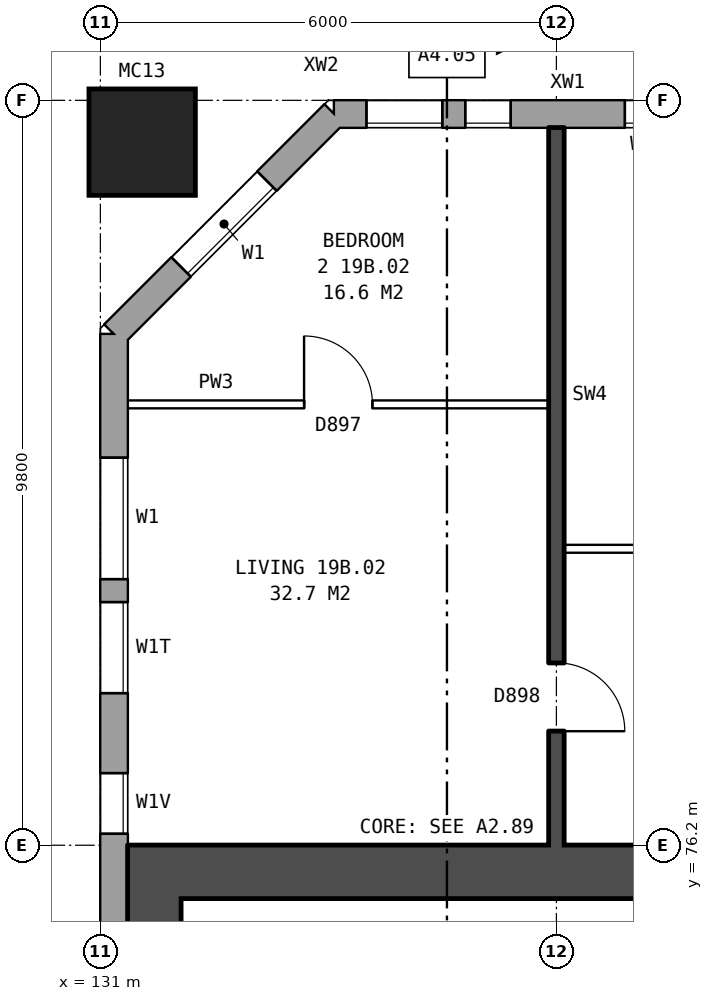
"""IFC4 building model, lengths in metres.
Left out: names, types, materials, properties, quantities, classifications, styles, units other than length and angle.
Written with IfcOpenShell. Run it as: python <this file> out.ifc"""

import sys

from ifc_helpers import new_model, si_unit, direction, frame, frame_2d, origin, origin_2d, place, context, subcontext, project, spatial, rectangle, hollow_rectangle, extrude, element, fill, save


model = new_model("IFC4")
c1 = context("Model", 3, precision=1e-05, world=origin(), true_north=direction((0.0, 1.0)))
c2 = subcontext(c1, "Body", "Model", "MODEL_VIEW")
j1 = project(units=[si_unit("LENGTHUNIT", "METRE"), si_unit("PLANEANGLEUNIT", "RADIAN")], contexts=[c1])
p1 = place(None, origin())
s1 = spatial("IfcSite", under=j1, at=p1, CompositionType="ELEMENT")
p2 = place(p1, origin())
s2 = spatial("IfcBuilding", under=s1, at=p2, CompositionType="ELEMENT")
p3 = place(p2, frame((0.0, 0.0, 71.6)))
s3 = spatial("IfcBuildingStorey", under=s2, at=p3, CompositionType="ELEMENT", Elevation=71.6)
p4 = place(p3, frame((131.55, 85.45, 0.0), z_axis=(0.0, 0.0, 1.0), x_axis=(1.0, 0.0, 0.0)))
e1 = element("IfcColumn", 1, at=p4, inside=s3, PredefinedType="COLUMN", context=c2, shape_type="SweptSolid", body=[
    extrude(hollow_rectangle(XDim=1.4, YDim=1.4, WallThickness=0.075, at=origin_2d()), origin(), (0.0, 0.0, 1.0), 3.1),
])
p5 = place(p3, frame((172.175, 85.82, 0.0), z_axis=(0.0, 0.0, 1.0), x_axis=(-1.0, 0.0, 0.0)))
e2 = element("IfcWall", 2, at=p5, inside=s3, PredefinedType="STANDARD", context=c2, shape_type="SweptSolid", body=[
    extrude(rectangle(XDim=38.101, YDim=0.36, at=frame_2d((19.05, 0.0))), origin(), (0.0, 0.0, 1.0), 2.85),
])
p6 = place(p5, frame((0.3, 0.0, 0.8)))
e3 = element("IfcOpeningElement", 3, at=p6, cuts=e2, PredefinedType="OPENING", context=c2, shape_type="SweptSolid", body=[
    extrude(rectangle(XDim=1.0, YDim=1.8, at=frame_2d((0.5, 0.9))), frame((0.0, 0.19, 0.0), z_axis=(0.0, -1.0, 0.0), x_axis=(1.0, 0.0, 0.0)), (0.0, 0.0, 1.0), 0.38),
])
p7 = place(p5, frame((5.875, 0.0, 0.8)))
e4 = element("IfcOpeningElement", 4, at=p7, cuts=e2, PredefinedType="OPENING", context=c2, shape_type="SweptSolid", body=[
    extrude(rectangle(XDim=1.6, YDim=1.8, at=frame_2d((0.8, 0.9))), frame((0.0, 0.19, 0.0), z_axis=(0.0, -1.0, 0.0), x_axis=(1.0, 0.0, 0.0)), (0.0, 0.0, 1.0), 0.38),
])
p8 = place(p5, frame((8.875, 0.0, 0.8)))
e5 = element("IfcOpeningElement", 5, at=p8, cuts=e2, PredefinedType="OPENING", context=c2, shape_type="SweptSolid", body=[
    extrude(rectangle(XDim=1.6, YDim=1.8, at=frame_2d((0.8, 0.9))), frame((0.0, 0.19, 0.0), z_axis=(0.0, -1.0, 0.0), x_axis=(1.0, 0.0, 0.0)), (0.0, 0.0, 1.0), 0.38),
])
p9 = place(p5, frame((11.875, 0.0, 0.8)))
e6 = element("IfcOpeningElement", 6, at=p9, cuts=e2, PredefinedType="OPENING", context=c2, shape_type="SweptSolid", body=[
    extrude(rectangle(XDim=1.6, YDim=1.8, at=frame_2d((0.8, 0.9))), frame((0.0, 0.19, 0.0), z_axis=(0.0, -1.0, 0.0), x_axis=(1.0, 0.0, 0.0)), (0.0, 0.0, 1.0), 0.38),
])
p10 = place(p5, frame((14.875, 0.0, 0.8)))
e7 = element("IfcOpeningElement", 7, at=p10, cuts=e2, PredefinedType="OPENING", context=c2, shape_type="SweptSolid", body=[
    extrude(rectangle(XDim=1.6, YDim=1.8, at=frame_2d((0.8, 0.9))), frame((0.0, 0.19, 0.0), z_axis=(0.0, -1.0, 0.0), x_axis=(1.0, 0.0, 0.0)), (0.0, 0.0, 1.0), 0.38),
])
p11 = place(p5, frame((17.875, 0.0, 0.8)))
e8 = element("IfcOpeningElement", 8, at=p11, cuts=e2, PredefinedType="OPENING", context=c2, shape_type="SweptSolid", body=[
    extrude(rectangle(XDim=1.6, YDim=1.8, at=frame_2d((0.8, 0.9))), frame((0.0, 0.19, 0.0), z_axis=(0.0, -1.0, 0.0), x_axis=(1.0, 0.0, 0.0)), (0.0, 0.0, 1.0), 0.38),
])
p12 = place(p5, frame((20.875, 0.0, 0.8)))
e9 = element("IfcOpeningElement", 9, at=p12, cuts=e2, PredefinedType="OPENING", context=c2, shape_type="SweptSolid", body=[
    extrude(rectangle(XDim=1.6, YDim=1.8, at=frame_2d((0.8, 0.9))), frame((0.0, 0.19, 0.0), z_axis=(0.0, -1.0, 0.0), x_axis=(1.0, 0.0, 0.0)), (0.0, 0.0, 1.0), 0.38),
])
p13 = place(p5, frame((23.875, 0.0, 0.8)))
e10 = element("IfcOpeningElement", 10, at=p13, cuts=e2, PredefinedType="OPENING", context=c2, shape_type="SweptSolid", body=[
    extrude(rectangle(XDim=1.6, YDim=1.8, at=frame_2d((0.8, 0.9))), frame((0.0, 0.19, 0.0), z_axis=(0.0, -1.0, 0.0), x_axis=(1.0, 0.0, 0.0)), (0.0, 0.0, 1.0), 0.38),
])
p14 = place(p5, frame((26.875, 0.0, 0.8)))
e11 = element("IfcOpeningElement", 11, at=p14, cuts=e2, PredefinedType="OPENING", context=c2, shape_type="SweptSolid", body=[
    extrude(rectangle(XDim=1.6, YDim=1.8, at=frame_2d((0.8, 0.9))), frame((0.0, 0.19, 0.0), z_axis=(0.0, -1.0, 0.0), x_axis=(1.0, 0.0, 0.0)), (0.0, 0.0, 1.0), 0.38),
])
p15 = place(p5, frame((29.875, 0.0, 0.8)))
e12 = element("IfcOpeningElement", 12, at=p15, cuts=e2, PredefinedType="OPENING", context=c2, shape_type="SweptSolid", body=[
    extrude(rectangle(XDim=1.6, YDim=1.8, at=frame_2d((0.8, 0.9))), frame((0.0, 0.19, 0.0), z_axis=(0.0, -1.0, 0.0), x_axis=(1.0, 0.0, 0.0)), (0.0, 0.0, 1.0), 0.38),
])
p16 = place(p5, frame((31.775, 0.0, 0.8)))
e13 = element("IfcOpeningElement", 13, at=p16, cuts=e2, PredefinedType="OPENING", context=c2, shape_type="SweptSolid", body=[
    extrude(rectangle(XDim=1.6, YDim=1.8, at=frame_2d((0.8, 0.9))), frame((0.0, 0.19, 0.0), z_axis=(0.0, -1.0, 0.0), x_axis=(1.0, 0.0, 0.0)), (0.0, 0.0, 1.0), 0.38),
])
p17 = place(p5, frame((35.775, 0.0, 1.7)))
e14 = element("IfcOpeningElement", 14, at=p17, cuts=e2, PredefinedType="OPENING", context=c2, shape_type="SweptSolid", body=[
    extrude(rectangle(XDim=0.6, YDim=0.9, at=frame_2d((0.3, 0.45))), frame((0.0, 0.19, 0.0), z_axis=(0.0, -1.0, 0.0), x_axis=(1.0, 0.0, 0.0)), (0.0, 0.0, 1.0), 0.38),
])
p18 = place(p5, frame((1.6, 0.0, 1.6)))
e15 = element("IfcOpeningElement", 15, at=p18, cuts=e2, PredefinedType="OPENING", context=c2, shape_type="SweptSolid", body=[
    extrude(rectangle(XDim=0.6, YDim=0.9, at=frame_2d((0.3, 0.45))), frame((0.0, 0.19, 0.0), z_axis=(0.0, -1.0, 0.0), x_axis=(1.0, 0.0, 0.0)), (0.0, 0.0, 1.0), 0.38),
])
p19 = place(p5, frame((3.5, 0.0, 0.8)))
e16 = element("IfcOpeningElement", 16, at=p19, cuts=e2, PredefinedType="OPENING", context=c2, shape_type="SweptSolid", body=[
    extrude(rectangle(XDim=1.4, YDim=0.9, at=frame_2d((0.7, 0.45))), frame((0.0, 0.19, 0.0), z_axis=(0.0, -1.0, 0.0), x_axis=(1.0, 0.0, 0.0)), (0.0, 0.0, 1.0), 0.38),
])
p20 = place(p5, frame((33.675, 0.0, 0.8)))
e17 = element("IfcOpeningElement", 17, at=p20, cuts=e2, PredefinedType="OPENING", context=c2, shape_type="SweptSolid", body=[
    extrude(rectangle(XDim=0.6, YDim=1.2, at=frame_2d((0.3, 0.6))), frame((0.0, 0.19, 0.0), z_axis=(0.0, -1.0, 0.0), x_axis=(1.0, 0.0, 0.0)), (0.0, 0.0, 1.0), 0.38),
])
p21 = place(p5, frame((36.675, 0.0, 0.8)))
e18 = element("IfcOpeningElement", 18, at=p21, cuts=e2, PredefinedType="OPENING", context=c2, shape_type="SweptSolid", body=[
    extrude(rectangle(XDim=1.0, YDim=1.8, at=frame_2d((0.5, 0.9))), frame((0.0, 0.19, 0.0), z_axis=(0.0, -1.0, 0.0), x_axis=(1.0, 0.0, 0.0)), (0.0, 0.0, 1.0), 0.38),
])
p22 = place(p3, frame((134.075, 85.82, 0.0), z_axis=(0.0, 0.0, 1.0), x_axis=(-0.707106781187, -0.707106781187, 0.0)))
e19 = element("IfcWall", 19, at=p22, inside=s3, PredefinedType="STANDARD", context=c2, shape_type="SweptSolid", body=[
    extrude(rectangle(XDim=4.094, YDim=0.36, at=frame_2d((2.047, 0.0))), origin(), (0.0, 0.0, 1.0), 2.85),
])
p23 = place(p22, frame((1.247, 0.0, 0.8)))
e20 = element("IfcOpeningElement", 20, at=p23, cuts=e19, PredefinedType="OPENING", context=c2, shape_type="SweptSolid", body=[
    extrude(rectangle(XDim=1.6, YDim=1.8, at=frame_2d((0.8, 0.9))), frame((0.0, 0.19, 0.0), z_axis=(0.0, -1.0, 0.0), x_axis=(1.0, 0.0, 0.0)), (0.0, 0.0, 1.0), 0.38),
])
p24 = place(p3, frame((131.18, 82.925, 0.0), z_axis=(0.0, 0.0, 1.0), x_axis=(0.0, -1.0, 0.0)))
e21 = element("IfcWall", 21, at=p24, inside=s3, PredefinedType="STANDARD", context=c2, shape_type="SweptSolid", body=[
    extrude(rectangle(XDim=25.851, YDim=0.36, at=frame_2d((12.925, 0.0))), origin(), (0.0, 0.0, 1.0), 2.85),
])
p25 = place(p24, frame((1.625, 0.0, 0.8)))
e22 = element("IfcOpeningElement", 22, at=p25, cuts=e21, PredefinedType="OPENING", context=c2, shape_type="SweptSolid", body=[
    extrude(rectangle(XDim=1.6, YDim=1.8, at=frame_2d((0.8, 0.9))), frame((0.0, 0.19, 0.0), z_axis=(0.0, -1.0, 0.0), x_axis=(1.0, 0.0, 0.0)), (0.0, 0.0, 1.0), 0.38),
])
p26 = place(p24, frame((3.525, 0.0, 1.7)))
e23 = element("IfcOpeningElement", 23, at=p26, cuts=e21, PredefinedType="OPENING", context=c2, shape_type="SweptSolid", body=[
    extrude(rectangle(XDim=1.2, YDim=0.9, at=frame_2d((0.6, 0.45))), frame((0.0, 0.19, 0.0), z_axis=(0.0, -1.0, 0.0), x_axis=(1.0, 0.0, 0.0)), (0.0, 0.0, 1.0), 0.38),
])
p27 = place(p24, frame((19.225, 0.0, 0.8)))
e24 = element("IfcOpeningElement", 24, at=p27, cuts=e21, PredefinedType="OPENING", context=c2, shape_type="SweptSolid", body=[
    extrude(rectangle(XDim=0.8, YDim=0.9, at=frame_2d((0.4, 0.45))), frame((0.0, 0.19, 0.0), z_axis=(0.0, -1.0, 0.0), x_axis=(1.0, 0.0, 0.0)), (0.0, 0.0, 1.0), 0.38),
])
p28 = place(p24, frame((22.625, 0.0, 0.8)))
e25 = element("IfcOpeningElement", 25, at=p28, cuts=e21, PredefinedType="OPENING", context=c2, shape_type="SweptSolid", body=[
    extrude(rectangle(XDim=1.6, YDim=1.8, at=frame_2d((0.8, 0.9))), frame((0.0, 0.19, 0.0), z_axis=(0.0, -1.0, 0.0), x_axis=(1.0, 0.0, 0.0)), (0.0, 0.0, 1.0), 0.38),
])
p29 = place(p24, frame((5.775, 0.0, 0.8)))
e26 = element("IfcOpeningElement", 26, at=p29, cuts=e21, PredefinedType="OPENING", context=c2, shape_type="SweptSolid", body=[
    extrude(rectangle(XDim=0.8, YDim=0.9, at=frame_2d((0.4, 0.45))), frame((0.0, 0.19, 0.0), z_axis=(0.0, -1.0, 0.0), x_axis=(1.0, 0.0, 0.0)), (0.0, 0.0, 1.0), 0.38),
])
p30 = place(p24, frame((21.075, 0.0, 1.7)))
e27 = element("IfcOpeningElement", 27, at=p30, cuts=e21, PredefinedType="OPENING", context=c2, shape_type="SweptSolid", body=[
    extrude(rectangle(XDim=1.2, YDim=0.9, at=frame_2d((0.6, 0.45))), frame((0.0, 0.19, 0.0), z_axis=(0.0, -1.0, 0.0), x_axis=(1.0, 0.0, 0.0)), (0.0, 0.0, 1.0), 0.38),
])
p31 = place(p3, frame((131.71, 64.5, 0.0), z_axis=(0.0, 0.0, 1.0), x_axis=(0.0, 1.0, 0.0)))
e28 = element("IfcWall", 28, at=p31, inside=s3, PredefinedType="SHEAR", context=c2, shape_type="SweptSolid", body=[
    extrude(rectangle(XDim=11.0, YDim=0.7, at=frame_2d((5.5, 0.0))), origin(), (0.0, 0.0, 1.0), 2.85),
])
p32 = place(p3, frame((139.76, 75.85, 0.0), z_axis=(0.0, 0.0, 1.0), x_axis=(-1.0, 0.0, 0.0)))
e29 = element("IfcWall", 29, at=p32, inside=s3, PredefinedType="SHEAR", context=c2, shape_type="SweptSolid", body=[
    extrude(rectangle(XDim=8.4, YDim=0.7, at=frame_2d((4.2, 0.0))), origin(), (0.0, 0.0, 1.0), 2.85),
])
p33 = place(p3, frame((137.1, 80.1, 0.0), z_axis=(0.0, 0.0, 1.0), x_axis=(1.0, 0.0, 0.0)))
e30 = element("IfcWall", 30, at=p33, inside=s3, PredefinedType="PARTITIONING", context=c2, shape_type="SweptSolid", body=[
    extrude(rectangle(XDim=5.8, YDim=0.1, at=frame_2d((2.9, 0.0))), origin(), (0.0, 0.0, 1.0), 2.85),
])
p34 = place(p33, frame((1.3, 0.0, 0.0)))
e31 = element("IfcOpeningElement", 31, at=p34, cuts=e30, PredefinedType="OPENING", context=c2, shape_type="SweptSolid", body=[
    extrude(rectangle(XDim=0.9, YDim=2.1, at=frame_2d((0.45, 1.05))), frame((0.0, 0.06, 0.0), z_axis=(0.0, -1.0, 0.0), x_axis=(1.0, 0.0, 0.0)), (0.0, 0.0, 1.0), 0.12),
])
p35 = place(p33, frame((4.2, 0.0, 0.0)))
e32 = element("IfcOpeningElement", 32, at=p35, cuts=e30, PredefinedType="OPENING", context=c2, shape_type="SweptSolid", body=[
    extrude(rectangle(XDim=0.9, YDim=2.1, at=frame_2d((0.45, 1.05))), frame((0.0, 0.06, 0.0), z_axis=(0.0, -1.0, 0.0), x_axis=(1.0, 0.0, 0.0)), (0.0, 0.0, 1.0), 0.12),
])
p36 = place(p3, frame((131.36, 82.0, 0.0), z_axis=(0.0, 0.0, 1.0), x_axis=(1.0, 0.0, 0.0)))
e33 = element("IfcWall", 33, at=p36, inside=s3, PredefinedType="PARTITIONING", context=c2, shape_type="SweptSolid", body=[
    extrude(rectangle(XDim=5.54, YDim=0.1, at=frame_2d((2.77, 0.0))), origin(), (0.0, 0.0, 1.0), 2.85),
])
p37 = place(p36, frame((2.32, 0.0, 0.0)))
e34 = element("IfcOpeningElement", 34, at=p37, cuts=e33, PredefinedType="OPENING", context=c2, shape_type="SweptSolid", body=[
    extrude(rectangle(XDim=0.9, YDim=2.1, at=frame_2d((0.45, 1.05))), frame((0.0, 0.06, 0.0), z_axis=(0.0, -1.0, 0.0), x_axis=(1.0, 0.0, 0.0)), (0.0, 0.0, 1.0), 0.12),
])
p38 = place(p3, frame((137.0, 76.2, 0.0), z_axis=(0.0, 0.0, 1.0), x_axis=(0.0, 1.0, 0.0)))
e35 = element("IfcWall", 35, at=p38, inside=s3, PredefinedType="SOLIDWALL", context=c2, shape_type="SweptSolid", body=[
    extrude(rectangle(XDim=9.44, YDim=0.2, at=frame_2d((4.72, 0.0))), origin(), (0.0, 0.0, 1.0), 2.85),
])
p39 = place(p38, frame((1.5, 0.0, 0.0)))
e36 = element("IfcOpeningElement", 36, at=p39, cuts=e35, PredefinedType="OPENING", context=c2, shape_type="SweptSolid", body=[
    extrude(rectangle(XDim=0.9, YDim=2.1, at=frame_2d((0.45, 1.05))), frame((0.0, 0.11, 0.0), z_axis=(0.0, -1.0, 0.0), x_axis=(1.0, 0.0, 0.0)), (0.0, 0.0, 1.0), 0.22),
])
p40 = place(p17, origin())
e37 = element("IfcWindow", 37, at=p40, inside=s3, PartitioningType="SINGLE_PANEL", PredefinedType="WINDOW", context=c2, shape_type="SweptSolid", body=[
    extrude(rectangle(XDim=0.6, YDim=0.9, at=frame_2d((0.3, 0.45))), frame((0.0, 0.15, 0.0), z_axis=(0.0, -1.0, 0.0), x_axis=(1.0, 0.0, 0.0)), (0.0, 0.0, 1.0), 0.06),
])
fill(e14, e37)
p41 = place(p23, origin())
e38 = element("IfcWindow", 38, at=p41, inside=s3, PartitioningType="SINGLE_PANEL", PredefinedType="WINDOW", context=c2, shape_type="SweptSolid", body=[
    extrude(rectangle(XDim=1.6, YDim=1.8, at=frame_2d((0.8, 0.9))), frame((0.0, 0.15, 0.0), z_axis=(0.0, -1.0, 0.0), x_axis=(1.0, 0.0, 0.0)), (0.0, 0.0, 1.0), 0.06),
])
fill(e20, e38)
p42 = place(p25, origin())
e39 = element("IfcWindow", 39, at=p42, inside=s3, PartitioningType="SINGLE_PANEL", PredefinedType="WINDOW", context=c2, shape_type="SweptSolid", body=[
    extrude(rectangle(XDim=1.6, YDim=1.8, at=frame_2d((0.8, 0.9))), frame((0.0, 0.15, 0.0), z_axis=(0.0, -1.0, 0.0), x_axis=(1.0, 0.0, 0.0)), (0.0, 0.0, 1.0), 0.06),
])
fill(e22, e39)
p43 = place(p26, origin())
e40 = element("IfcWindow", 40, at=p43, inside=s3, PartitioningType="SINGLE_PANEL", PredefinedType="WINDOW", context=c2, shape_type="SweptSolid", body=[
    extrude(rectangle(XDim=1.2, YDim=0.9, at=frame_2d((0.6, 0.45))), frame((0.0, 0.15, 0.0), z_axis=(0.0, -1.0, 0.0), x_axis=(1.0, 0.0, 0.0)), (0.0, 0.0, 1.0), 0.06),
])
fill(e23, e40)
p44 = place(p37, origin())
e41 = element("IfcDoor", 41, at=p44, inside=s3, OperationType="SINGLE_SWING_LEFT", PredefinedType="DOOR", context=c2, shape_type="SweptSolid", body=[
    extrude(rectangle(XDim=0.9, YDim=2.1, at=frame_2d((0.45, 1.05))), frame((0.0, 0.025, 0.0), z_axis=(0.0, -1.0, 0.0), x_axis=(1.0, 0.0, 0.0)), (0.0, 0.0, 1.0), 0.05),
])
fill(e34, e41)
p45 = place(p39, frame((0.9, 0.0, 0.0), z_axis=(0.0, 0.0, 1.0), x_axis=(-1.0, 0.0, 0.0)))
e42 = element("IfcDoor", 42, at=p45, inside=s3, OperationType="SINGLE_SWING_RIGHT", PredefinedType="DOOR", context=c2, shape_type="SweptSolid", body=[
    extrude(rectangle(XDim=0.9, YDim=2.1, at=frame_2d((0.45, 1.05))), frame((0.0, 0.025, 0.0), z_axis=(0.0, -1.0, 0.0), x_axis=(1.0, 0.0, 0.0)), (0.0, 0.0, 1.0), 0.05),
])
fill(e36, e42)
p46 = place(p20, origin())
e43 = element("IfcWindow", 43, at=p46, inside=s3, PartitioningType="SINGLE_PANEL", PredefinedType="WINDOW", context=c2, shape_type="SweptSolid", body=[
    extrude(rectangle(XDim=0.6, YDim=1.2, at=frame_2d((0.3, 0.6))), frame((0.0, 0.15, 0.0), z_axis=(0.0, -1.0, 0.0), x_axis=(1.0, 0.0, 0.0)), (0.0, 0.0, 1.0), 0.06),
])
fill(e17, e43)
p47 = place(p21, origin())
e44 = element("IfcWindow", 44, at=p47, inside=s3, PartitioningType="SINGLE_PANEL", PredefinedType="WINDOW", context=c2, shape_type="SweptSolid", body=[
    extrude(rectangle(XDim=1.0, YDim=1.8, at=frame_2d((0.5, 0.9))), frame((0.0, 0.15, 0.0), z_axis=(0.0, -1.0, 0.0), x_axis=(1.0, 0.0, 0.0)), (0.0, 0.0, 1.0), 0.06),
])
fill(e18, e44)
p48 = place(p29, origin())
e45 = element("IfcWindow", 45, at=p48, inside=s3, PartitioningType="SINGLE_PANEL", PredefinedType="WINDOW", context=c2, shape_type="SweptSolid", body=[
    extrude(rectangle(XDim=0.8, YDim=0.9, at=frame_2d((0.4, 0.45))), frame((0.0, 0.15, 0.0), z_axis=(0.0, -1.0, 0.0), x_axis=(1.0, 0.0, 0.0)), (0.0, 0.0, 1.0), 0.06),
])
fill(e26, e45)
save(model, sys.argv[1])
